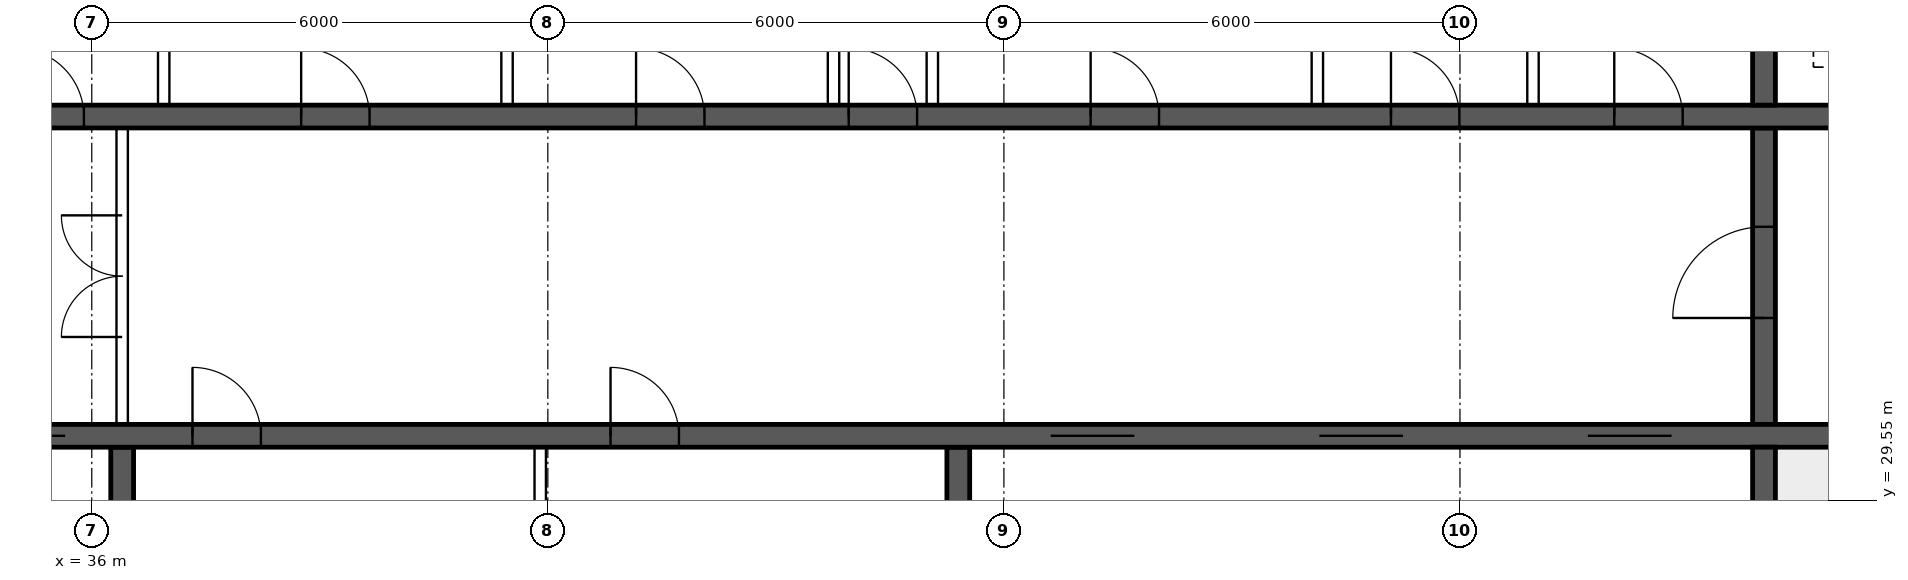
"""IFC4 building model, lengths in metres.
Left out: names, types, materials, properties, quantities, classifications, styles, units other than length and angle.
Written with IfcOpenShell. Run it as: python <this file> out.ifc"""

import sys

from ifc_helpers import new_model, si_unit, direction, frame, frame_2d, origin, place, context, subcontext, project, spatial, rectangle, extrude, element, fill, save


model = new_model("IFC4")
c1 = context("Model", 3, precision=1e-05, world=origin(), true_north=direction((0.0, 1.0)))
c2 = subcontext(c1, "Body", "Model", "MODEL_VIEW")
j1 = project(units=[si_unit("LENGTHUNIT", "METRE"), si_unit("PLANEANGLEUNIT", "RADIAN")], contexts=[c1])
p1 = place(None, origin())
s1 = spatial("IfcSite", under=j1, at=p1, CompositionType="ELEMENT")
p2 = place(p1, origin())
s2 = spatial("IfcBuilding", under=s1, at=p2, CompositionType="ELEMENT")
p3 = place(p2, frame((0.0, 0.0, 235.3)))
s3 = spatial("IfcBuildingStorey", under=s2, at=p3, CompositionType="ELEMENT", Elevation=235.3)
p4 = place(p3, frame((18.35, 30.4, 0.0), z_axis=(0.0, 0.0, 1.0), x_axis=(1.0, 0.0, 0.0)))
e1 = element("IfcWall", 1, at=p4, inside=s3, PredefinedType="SHEAR", context=c2, shape_type="SweptSolid", body=[
    extrude(rectangle(XDim=47.3, YDim=0.3, at=frame_2d((23.65, 0.0))), origin(), (0.0, 0.0, 1.0), 3.75),
])
p5 = place(p4, frame((0.4, 0.0, 0.0)))
e2 = element("IfcOpeningElement", 2, at=p5, cuts=e1, PredefinedType="OPENING", context=c2, shape_type="SweptSolid", body=[
    extrude(rectangle(XDim=1.0, YDim=2.1, at=frame_2d((0.5, 1.05))), frame((0.0, 0.16, 0.0), z_axis=(0.0, -1.0, 0.0), x_axis=(1.0, 0.0, 0.0)), (0.0, 0.0, 1.0), 0.32),
])
p6 = place(p4, frame((45.9, 0.0, 0.0)))
e3 = element("IfcOpeningElement", 3, at=p6, cuts=e1, PredefinedType="OPENING", context=c2, shape_type="SweptSolid", body=[
    extrude(rectangle(XDim=1.0, YDim=2.1, at=frame_2d((0.5, 1.05))), frame((0.0, 0.16, 0.0), z_axis=(0.0, -1.0, 0.0), x_axis=(1.0, 0.0, 0.0)), (0.0, 0.0, 1.0), 0.32),
])
p7 = place(p4, frame((8.4, 0.0, 0.0)))
e4 = element("IfcOpeningElement", 4, at=p7, cuts=e1, PredefinedType="OPENING", context=c2, shape_type="SweptSolid", body=[
    extrude(rectangle(XDim=1.1, YDim=2.1, at=frame_2d((0.55, 1.05))), frame((0.0, 0.16, 0.0), z_axis=(0.0, -1.0, 0.0), x_axis=(1.0, 0.0, 0.0)), (0.0, 0.0, 1.0), 0.32),
])
p8 = place(p4, frame((11.0, 0.0, 0.0)))
e5 = element("IfcOpeningElement", 5, at=p8, cuts=e1, PredefinedType="OPENING", context=c2, shape_type="SweptSolid", body=[
    extrude(rectangle(XDim=1.1, YDim=2.1, at=frame_2d((0.55, 1.05))), frame((0.0, 0.16, 0.0), z_axis=(0.0, -1.0, 0.0), x_axis=(1.0, 0.0, 0.0)), (0.0, 0.0, 1.0), 0.32),
])
p9 = place(p4, frame((13.6, 0.0, 0.0)))
e6 = element("IfcOpeningElement", 6, at=p9, cuts=e1, PredefinedType="OPENING", context=c2, shape_type="SweptSolid", body=[
    extrude(rectangle(XDim=1.1, YDim=2.1, at=frame_2d((0.55, 1.05))), frame((0.0, 0.16, 0.0), z_axis=(0.0, -1.0, 0.0), x_axis=(1.0, 0.0, 0.0)), (0.0, 0.0, 1.0), 0.32),
])
p10 = place(p4, frame((16.2, 0.0, 0.0)))
e7 = element("IfcOpeningElement", 7, at=p10, cuts=e1, PredefinedType="OPENING", context=c2, shape_type="SweptSolid", body=[
    extrude(rectangle(XDim=1.1, YDim=2.1, at=frame_2d((0.55, 1.05))), frame((0.0, 0.16, 0.0), z_axis=(0.0, -1.0, 0.0), x_axis=(1.0, 0.0, 0.0)), (0.0, 0.0, 1.0), 0.32),
])
p11 = place(p4, frame((18.975, 0.0, 0.0)))
e8 = element("IfcOpeningElement", 8, at=p11, cuts=e1, PredefinedType="OPENING", context=c2, shape_type="SweptSolid", body=[
    extrude(rectangle(XDim=0.9, YDim=2.1, at=frame_2d((0.45, 1.05))), frame((0.0, 0.16, 0.0), z_axis=(0.0, -1.0, 0.0), x_axis=(1.0, 0.0, 0.0)), (0.0, 0.0, 1.0), 0.32),
])
p12 = place(p4, frame((24.475, 0.0, 0.0)))
e9 = element("IfcOpeningElement", 9, at=p12, cuts=e1, PredefinedType="OPENING", context=c2, shape_type="SweptSolid", body=[
    extrude(rectangle(XDim=0.9, YDim=2.1, at=frame_2d((0.45, 1.05))), frame((0.0, 0.16, 0.0), z_axis=(0.0, -1.0, 0.0), x_axis=(1.0, 0.0, 0.0)), (0.0, 0.0, 1.0), 0.32),
])
p13 = place(p4, frame((30.267, 0.0, 0.0)))
e10 = element("IfcOpeningElement", 10, at=p13, cuts=e1, PredefinedType="OPENING", context=c2, shape_type="SweptSolid", body=[
    extrude(rectangle(XDim=1.1, YDim=2.1, at=frame_2d((0.55, 1.05))), frame((0.0, 0.16, 0.0), z_axis=(0.0, -1.0, 0.0), x_axis=(1.0, 0.0, 0.0)), (0.0, 0.0, 1.0), 0.32),
])
p14 = place(p4, frame((33.8, 0.0, 0.0)))
e11 = element("IfcOpeningElement", 11, at=p14, cuts=e1, PredefinedType="OPENING", context=c2, shape_type="SweptSolid", body=[
    extrude(rectangle(XDim=1.1, YDim=2.1, at=frame_2d((0.55, 1.05))), frame((0.0, 0.16, 0.0), z_axis=(0.0, -1.0, 0.0), x_axis=(1.0, 0.0, 0.0)), (0.0, 0.0, 1.0), 0.32),
])
p15 = place(p4, frame((37.333, 0.0, 0.0)))
e12 = element("IfcOpeningElement", 12, at=p15, cuts=e1, PredefinedType="OPENING", context=c2, shape_type="SweptSolid", body=[
    extrude(rectangle(XDim=1.1, YDim=2.1, at=frame_2d((0.55, 1.05))), frame((0.0, 0.16, 0.0), z_axis=(0.0, -1.0, 0.0), x_axis=(1.0, 0.0, 0.0)), (0.0, 0.0, 1.0), 0.32),
])
p16 = place(p3, frame((18.35, 34.6, 0.0), z_axis=(0.0, 0.0, 1.0), x_axis=(1.0, 0.0, 0.0)))
e13 = element("IfcWall", 13, at=p16, inside=s3, PredefinedType="SHEAR", context=c2, shape_type="SweptSolid", body=[
    extrude(rectangle(XDim=47.3, YDim=0.3, at=frame_2d((23.65, 0.0))), origin(), (0.0, 0.0, 1.0), 3.75),
])
p17 = place(p16, frame((0.9, 0.0, 0.0)))
e14 = element("IfcOpeningElement", 14, at=p17, cuts=e13, PredefinedType="OPENING", context=c2, shape_type="SweptSolid", body=[
    extrude(rectangle(XDim=1.1, YDim=2.1, at=frame_2d((0.55, 1.05))), frame((0.0, 0.16, 0.0), z_axis=(0.0, -1.0, 0.0), x_axis=(1.0, 0.0, 0.0)), (0.0, 0.0, 1.0), 0.32),
])
p18 = place(p16, frame((45.3, 0.0, 0.0)))
e15 = element("IfcOpeningElement", 15, at=p18, cuts=e13, PredefinedType="OPENING", context=c2, shape_type="SweptSolid", body=[
    extrude(rectangle(XDim=1.1, YDim=2.1, at=frame_2d((0.55, 1.05))), frame((0.0, 0.16, 0.0), z_axis=(0.0, -1.0, 0.0), x_axis=(1.0, 0.0, 0.0)), (0.0, 0.0, 1.0), 0.32),
])
p19 = place(p16, frame((4.25, 0.0, 0.0)))
e16 = element("IfcOpeningElement", 16, at=p19, cuts=e13, PredefinedType="OPENING", context=c2, shape_type="SweptSolid", body=[
    extrude(rectangle(XDim=0.9, YDim=2.1, at=frame_2d((0.45, 1.05))), frame((0.0, 0.16, 0.0), z_axis=(0.0, -1.0, 0.0), x_axis=(1.0, 0.0, 0.0)), (0.0, 0.0, 1.0), 0.32),
])
p20 = place(p16, frame((42.15, 0.0, 0.0)))
e17 = element("IfcOpeningElement", 17, at=p20, cuts=e13, PredefinedType="OPENING", context=c2, shape_type="SweptSolid", body=[
    extrude(rectangle(XDim=0.9, YDim=2.1, at=frame_2d((0.45, 1.05))), frame((0.0, 0.16, 0.0), z_axis=(0.0, -1.0, 0.0), x_axis=(1.0, 0.0, 0.0)), (0.0, 0.0, 1.0), 0.32),
])
p21 = place(p16, frame((9.025, 0.0, 0.0)))
e18 = element("IfcOpeningElement", 18, at=p21, cuts=e13, PredefinedType="OPENING", context=c2, shape_type="SweptSolid", body=[
    extrude(rectangle(XDim=0.9, YDim=2.1, at=frame_2d((0.45, 1.05))), frame((0.0, 0.16, 0.0), z_axis=(0.0, -1.0, 0.0), x_axis=(1.0, 0.0, 0.0)), (0.0, 0.0, 1.0), 0.32),
])
p22 = place(p16, frame((12.999, 0.0, 0.0)))
e19 = element("IfcOpeningElement", 19, at=p22, cuts=e13, PredefinedType="OPENING", context=c2, shape_type="SweptSolid", body=[
    extrude(rectangle(XDim=0.9, YDim=2.1, at=frame_2d((0.45, 1.05))), frame((0.0, 0.16, 0.0), z_axis=(0.0, -1.0, 0.0), x_axis=(1.0, 0.0, 0.0)), (0.0, 0.0, 1.0), 0.32),
])
p23 = place(p16, frame((16.646, 0.0, 0.0)))
e20 = element("IfcOpeningElement", 20, at=p23, cuts=e13, PredefinedType="OPENING", context=c2, shape_type="SweptSolid", body=[
    extrude(rectangle(XDim=0.9, YDim=2.1, at=frame_2d((0.45, 1.05))), frame((0.0, 0.16, 0.0), z_axis=(0.0, -1.0, 0.0), x_axis=(1.0, 0.0, 0.0)), (0.0, 0.0, 1.0), 0.32),
])
p24 = place(p16, frame((20.405, 0.0, 0.0)))
e21 = element("IfcOpeningElement", 21, at=p24, cuts=e13, PredefinedType="OPENING", context=c2, shape_type="SweptSolid", body=[
    extrude(rectangle(XDim=0.9, YDim=2.1, at=frame_2d((0.45, 1.05))), frame((0.0, 0.16, 0.0), z_axis=(0.0, -1.0, 0.0), x_axis=(1.0, 0.0, 0.0)), (0.0, 0.0, 1.0), 0.32),
])
p25 = place(p16, frame((24.811, 0.0, 0.0)))
e22 = element("IfcOpeningElement", 22, at=p25, cuts=e13, PredefinedType="OPENING", context=c2, shape_type="SweptSolid", body=[
    extrude(rectangle(XDim=0.9, YDim=2.1, at=frame_2d((0.45, 1.05))), frame((0.0, 0.16, 0.0), z_axis=(0.0, -1.0, 0.0), x_axis=(1.0, 0.0, 0.0)), (0.0, 0.0, 1.0), 0.32),
])
p26 = place(p16, frame((27.608, 0.0, 0.0)))
e23 = element("IfcOpeningElement", 23, at=p26, cuts=e13, PredefinedType="OPENING", context=c2, shape_type="SweptSolid", body=[
    extrude(rectangle(XDim=0.9, YDim=2.1, at=frame_2d((0.45, 1.05))), frame((0.0, 0.16, 0.0), z_axis=(0.0, -1.0, 0.0), x_axis=(1.0, 0.0, 0.0)), (0.0, 0.0, 1.0), 0.32),
])
p27 = place(p16, frame((30.791, 0.0, 0.0)))
e24 = element("IfcOpeningElement", 24, at=p27, cuts=e13, PredefinedType="OPENING", context=c2, shape_type="SweptSolid", body=[
    extrude(rectangle(XDim=0.9, YDim=2.1, at=frame_2d((0.45, 1.05))), frame((0.0, 0.16, 0.0), z_axis=(0.0, -1.0, 0.0), x_axis=(1.0, 0.0, 0.0)), (0.0, 0.0, 1.0), 0.32),
])
p28 = place(p16, frame((34.742, 0.0, 0.0)))
e25 = element("IfcOpeningElement", 25, at=p28, cuts=e13, PredefinedType="OPENING", context=c2, shape_type="SweptSolid", body=[
    extrude(rectangle(XDim=0.9, YDim=2.1, at=frame_2d((0.45, 1.05))), frame((0.0, 0.16, 0.0), z_axis=(0.0, -1.0, 0.0), x_axis=(1.0, 0.0, 0.0)), (0.0, 0.0, 1.0), 0.32),
])
p29 = place(p16, frame((37.68, 0.0, 0.0)))
e26 = element("IfcOpeningElement", 26, at=p29, cuts=e13, PredefinedType="OPENING", context=c2, shape_type="SweptSolid", body=[
    extrude(rectangle(XDim=0.9, YDim=2.1, at=frame_2d((0.45, 1.05))), frame((0.0, 0.16, 0.0), z_axis=(0.0, -1.0, 0.0), x_axis=(1.0, 0.0, 0.0)), (0.0, 0.0, 1.0), 0.32),
])
p30 = place(p3, frame((58.0, 26.15, 0.0), z_axis=(0.0, 0.0, 1.0), x_axis=(0.0, 1.0, 0.0)))
e27 = element("IfcWall", 27, at=p30, inside=s3, PredefinedType="SHEAR", context=c2, shape_type="SweptSolid", body=[
    extrude(rectangle(XDim=4.1, YDim=0.3, at=frame_2d((2.05, 0.0))), origin(), (0.0, 0.0, 1.0), 3.75),
])
p31 = place(p3, frame((58.0, 30.55, 0.0), z_axis=(0.0, 0.0, 1.0), x_axis=(0.0, 1.0, 0.0)))
e28 = element("IfcWall", 28, at=p31, inside=s3, PredefinedType="SHEAR", context=c2, shape_type="SweptSolid", body=[
    extrude(rectangle(XDim=3.9, YDim=0.3, at=frame_2d((1.95, 0.0))), origin(), (0.0, 0.0, 1.0), 3.75),
])
p32 = place(p31, frame((1.4, 0.0, 0.0)))
e29 = element("IfcOpeningElement", 29, at=p32, cuts=e28, PredefinedType="OPENING", context=c2, shape_type="SweptSolid", body=[
    extrude(rectangle(XDim=1.2, YDim=2.1, at=frame_2d((0.6, 1.05))), frame((0.0, 0.16, 0.0), z_axis=(0.0, -1.0, 0.0), x_axis=(1.0, 0.0, 0.0)), (0.0, 0.0, 1.0), 0.32),
])
p33 = place(p3, frame((58.0, 34.75, 0.0), z_axis=(0.0, 0.0, 1.0), x_axis=(0.0, 1.0, 0.0)))
e30 = element("IfcWall", 30, at=p33, inside=s3, PredefinedType="SHEAR", context=c2, shape_type="SweptSolid", body=[
    extrude(rectangle(XDim=3.1, YDim=0.3, at=frame_2d((1.55, 0.0))), origin(), (0.0, 0.0, 1.0), 3.75),
])
for number, where, z_axis, x_axis in (
    (31, (36.4, 26.15, 0.0), (0.0, 0.0, 1.0), (0.0, 1.0, 0.0)),
    (32, (47.4, 26.15, 0.0), (0.0, 0.0, 1.0), (0.0, 1.0, 0.0)),
):
    element("IfcWall", number, at=place(p3, frame(where, z_axis=z_axis, x_axis=x_axis)), inside=s3, PredefinedType="SHEAR", context=c2, shape_type="SweptSolid", body=[
        extrude(rectangle(XDim=4.1, YDim=0.3, at=frame_2d((2.05, 0.0))), origin(), (0.0, 0.0, 1.0), 3.75),
    ])
p34 = place(p3, frame((36.4, 30.55, 0.0), z_axis=(0.0, 0.0, 1.0), x_axis=(0.0, 1.0, 0.0)))
e33 = element("IfcWall", 33, at=p34, inside=s3, PredefinedType="SOLIDWALL", context=c2, shape_type="SweptSolid", body=[
    extrude(rectangle(XDim=3.9, YDim=0.15, at=frame_2d((1.95, 0.0))), origin(), (0.0, 0.0, 1.0), 3.5),
])
p35 = place(p34, frame((1.15, 0.0, 0.0)))
e34 = element("IfcOpeningElement", 34, at=p35, cuts=e33, PredefinedType="OPENING", context=c2, shape_type="SweptSolid", body=[
    extrude(rectangle(XDim=1.6, YDim=2.1, at=frame_2d((0.8, 1.05))), frame((0.0, 0.085, 0.0), z_axis=(0.0, -1.0, 0.0), x_axis=(1.0, 0.0, 0.0)), (0.0, 0.0, 1.0), 0.17),
])
for number, where, z_axis, x_axis in (
    (35, (36.946, 34.75, 0.0), (0.0, 0.0, 1.0), (0.0, 1.0, 0.0)),
    (36, (41.463, 34.75, 0.0), (0.0, 0.0, 1.0), (0.0, 1.0, 0.0)),
    (37, (45.758, 34.75, 0.0), (0.0, 0.0, 1.0), (0.0, 1.0, 0.0)),
    (38, (47.058, 34.75, 0.0), (0.0, 0.0, 1.0), (0.0, 1.0, 0.0)),
    (39, (52.124, 34.75, 0.0), (0.0, 0.0, 1.0), (0.0, 1.0, 0.0)),
    (40, (54.961, 34.75, 0.0), (0.0, 0.0, 1.0), (0.0, 1.0, 0.0)),
):
    element("IfcWall", number, at=place(p3, frame(where, z_axis=z_axis, x_axis=x_axis)), inside=s3, PredefinedType="SOLIDWALL", context=c2, shape_type="SweptSolid", body=[
        extrude(rectangle(XDim=3.1, YDim=0.15, at=frame_2d((1.55, 0.0))), origin(), (0.0, 0.0, 1.0), 3.5),
    ])
p36 = place(p3, frame((41.9, 26.15, 0.0), z_axis=(0.0, 0.0, 1.0), x_axis=(0.0, 1.0, 0.0)))
e41 = element("IfcWall", 41, at=p36, inside=s3, PredefinedType="SOLIDWALL", context=c2, shape_type="SweptSolid", body=[
    extrude(rectangle(XDim=4.1, YDim=0.15, at=frame_2d((2.05, 0.0))), origin(), (0.0, 0.0, 1.0), 3.5),
])
p37 = place(p35, origin())
e42 = element("IfcDoor", 42, at=p37, inside=s3, OperationType="DOUBLE_DOOR_SINGLE_SWING", PredefinedType="DOOR", context=c2, shape_type="SweptSolid", body=[
    extrude(rectangle(XDim=1.6, YDim=2.1, at=frame_2d((0.8, 1.05))), frame((0.0, 0.025, 0.0), z_axis=(0.0, -1.0, 0.0), x_axis=(1.0, 0.0, 0.0)), (0.0, 0.0, 1.0), 0.05),
])
fill(e34, e42)
p38 = place(p32, origin())
e43 = element("IfcDoor", 43, at=p38, inside=s3, OperationType="SINGLE_SWING_LEFT", PredefinedType="DOOR", context=c2, shape_type="SweptSolid", body=[
    extrude(rectangle(XDim=1.2, YDim=2.1, at=frame_2d((0.6, 1.05))), frame((0.0, 0.025, 0.0), z_axis=(0.0, -1.0, 0.0), x_axis=(1.0, 0.0, 0.0)), (0.0, 0.0, 1.0), 0.05),
])
fill(e29, e43)
p39 = place(p23, origin())
e44 = element("IfcDoor", 44, at=p39, inside=s3, OperationType="SINGLE_SWING_LEFT", PredefinedType="DOOR", context=c2, shape_type="SweptSolid", body=[
    extrude(rectangle(XDim=0.9, YDim=2.1, at=frame_2d((0.45, 1.05))), frame((0.0, 0.025, 0.0), z_axis=(0.0, -1.0, 0.0), x_axis=(1.0, 0.0, 0.0)), (0.0, 0.0, 1.0), 0.05),
])
fill(e20, e44)
p40 = place(p24, origin())
e45 = element("IfcDoor", 45, at=p40, inside=s3, OperationType="SINGLE_SWING_LEFT", PredefinedType="DOOR", context=c2, shape_type="SweptSolid", body=[
    extrude(rectangle(XDim=0.9, YDim=2.1, at=frame_2d((0.45, 1.05))), frame((0.0, 0.025, 0.0), z_axis=(0.0, -1.0, 0.0), x_axis=(1.0, 0.0, 0.0)), (0.0, 0.0, 1.0), 0.05),
])
fill(e21, e45)
p41 = place(p25, origin())
e46 = element("IfcDoor", 46, at=p41, inside=s3, OperationType="SINGLE_SWING_LEFT", PredefinedType="DOOR", context=c2, shape_type="SweptSolid", body=[
    extrude(rectangle(XDim=0.9, YDim=2.1, at=frame_2d((0.45, 1.05))), frame((0.0, 0.025, 0.0), z_axis=(0.0, -1.0, 0.0), x_axis=(1.0, 0.0, 0.0)), (0.0, 0.0, 1.0), 0.05),
])
fill(e22, e46)
p42 = place(p26, origin())
e47 = element("IfcDoor", 47, at=p42, inside=s3, OperationType="SINGLE_SWING_LEFT", PredefinedType="DOOR", context=c2, shape_type="SweptSolid", body=[
    extrude(rectangle(XDim=0.9, YDim=2.1, at=frame_2d((0.45, 1.05))), frame((0.0, 0.025, 0.0), z_axis=(0.0, -1.0, 0.0), x_axis=(1.0, 0.0, 0.0)), (0.0, 0.0, 1.0), 0.05),
])
fill(e23, e47)
p43 = place(p27, origin())
e48 = element("IfcDoor", 48, at=p43, inside=s3, OperationType="SINGLE_SWING_LEFT", PredefinedType="DOOR", context=c2, shape_type="SweptSolid", body=[
    extrude(rectangle(XDim=0.9, YDim=2.1, at=frame_2d((0.45, 1.05))), frame((0.0, 0.025, 0.0), z_axis=(0.0, -1.0, 0.0), x_axis=(1.0, 0.0, 0.0)), (0.0, 0.0, 1.0), 0.05),
])
fill(e24, e48)
p44 = place(p28, origin())
e49 = element("IfcDoor", 49, at=p44, inside=s3, OperationType="SINGLE_SWING_LEFT", PredefinedType="DOOR", context=c2, shape_type="SweptSolid", body=[
    extrude(rectangle(XDim=0.9, YDim=2.1, at=frame_2d((0.45, 1.05))), frame((0.0, 0.025, 0.0), z_axis=(0.0, -1.0, 0.0), x_axis=(1.0, 0.0, 0.0)), (0.0, 0.0, 1.0), 0.05),
])
fill(e25, e49)
p45 = place(p29, origin())
e50 = element("IfcDoor", 50, at=p45, inside=s3, OperationType="SINGLE_SWING_LEFT", PredefinedType="DOOR", context=c2, shape_type="SweptSolid", body=[
    extrude(rectangle(XDim=0.9, YDim=2.1, at=frame_2d((0.45, 1.05))), frame((0.0, 0.025, 0.0), z_axis=(0.0, -1.0, 0.0), x_axis=(1.0, 0.0, 0.0)), (0.0, 0.0, 1.0), 0.05),
])
fill(e26, e50)
p46 = place(p10, origin())
e51 = element("IfcDoor", 51, at=p46, inside=s3, OperationType="DOUBLE_DOOR_SLIDING", PredefinedType="DOOR", context=c2, shape_type="SweptSolid", body=[
    extrude(rectangle(XDim=1.1, YDim=2.1, at=frame_2d((0.55, 1.05))), frame((0.0, 0.025, 0.0), z_axis=(0.0, -1.0, 0.0), x_axis=(1.0, 0.0, 0.0)), (0.0, 0.0, 1.0), 0.05),
])
fill(e7, e51)
p47 = place(p11, origin())
e52 = element("IfcDoor", 52, at=p47, inside=s3, OperationType="SINGLE_SWING_LEFT", PredefinedType="DOOR", context=c2, shape_type="SweptSolid", body=[
    extrude(rectangle(XDim=0.9, YDim=2.1, at=frame_2d((0.45, 1.05))), frame((0.0, 0.025, 0.0), z_axis=(0.0, -1.0, 0.0), x_axis=(1.0, 0.0, 0.0)), (0.0, 0.0, 1.0), 0.05),
])
fill(e8, e52)
p48 = place(p12, origin())
e53 = element("IfcDoor", 53, at=p48, inside=s3, OperationType="SINGLE_SWING_LEFT", PredefinedType="DOOR", context=c2, shape_type="SweptSolid", body=[
    extrude(rectangle(XDim=0.9, YDim=2.1, at=frame_2d((0.45, 1.05))), frame((0.0, 0.025, 0.0), z_axis=(0.0, -1.0, 0.0), x_axis=(1.0, 0.0, 0.0)), (0.0, 0.0, 1.0), 0.05),
])
fill(e9, e53)
p49 = place(p13, origin())
e54 = element("IfcDoor", 54, at=p49, inside=s3, OperationType="DOUBLE_DOOR_SLIDING", PredefinedType="DOOR", context=c2, shape_type="SweptSolid", body=[
    extrude(rectangle(XDim=1.1, YDim=2.1, at=frame_2d((0.55, 1.05))), frame((0.0, 0.025, 0.0), z_axis=(0.0, -1.0, 0.0), x_axis=(1.0, 0.0, 0.0)), (0.0, 0.0, 1.0), 0.05),
])
fill(e10, e54)
p50 = place(p14, origin())
e55 = element("IfcDoor", 55, at=p50, inside=s3, OperationType="DOUBLE_DOOR_SLIDING", PredefinedType="DOOR", context=c2, shape_type="SweptSolid", body=[
    extrude(rectangle(XDim=1.1, YDim=2.1, at=frame_2d((0.55, 1.05))), frame((0.0, 0.025, 0.0), z_axis=(0.0, -1.0, 0.0), x_axis=(1.0, 0.0, 0.0)), (0.0, 0.0, 1.0), 0.05),
])
fill(e11, e55)
p51 = place(p15, origin())
e56 = element("IfcDoor", 56, at=p51, inside=s3, OperationType="DOUBLE_DOOR_SLIDING", PredefinedType="DOOR", context=c2, shape_type="SweptSolid", body=[
    extrude(rectangle(XDim=1.1, YDim=2.1, at=frame_2d((0.55, 1.05))), frame((0.0, 0.025, 0.0), z_axis=(0.0, -1.0, 0.0), x_axis=(1.0, 0.0, 0.0)), (0.0, 0.0, 1.0), 0.05),
])
fill(e12, e56)
save(model, sys.argv[1])
